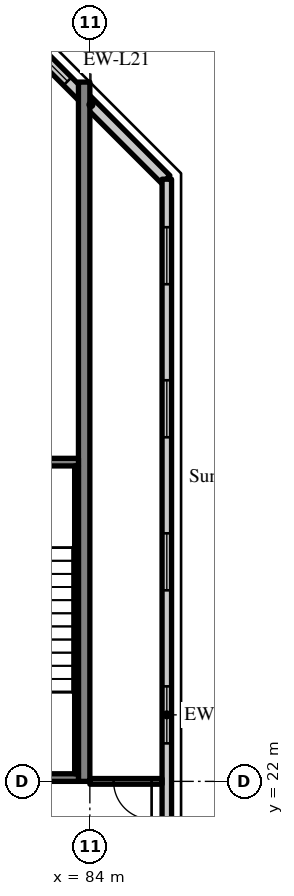
"""IFC4 building model, lengths in metres.
Left out: names, types, materials, properties, quantities, classifications, styles, units other than length and angle.
Written with IfcOpenShell. Run it as: python <this file> out.ifc"""

import sys

from ifc_helpers import new_model, si_unit, direction, frame, frame_2d, origin, place, context, subcontext, project, spatial, rectangle, extrude, source, transform, mapped, element, fill, save


model = new_model("IFC4")
c1 = context("Model", 3, precision=1e-05, world=origin(), true_north=direction((0.0, 1.0)))
c2 = subcontext(c1, "Body", "Model", "MODEL_VIEW")
j1 = project(units=[si_unit("LENGTHUNIT", "METRE"), si_unit("PLANEANGLEUNIT", "RADIAN")], contexts=[c1])
p1 = place(None, origin())
s1 = spatial("IfcSite", under=j1, at=p1, CompositionType="ELEMENT")
p2 = place(p1, origin())
s2 = spatial("IfcBuilding", under=s1, at=p2, CompositionType="ELEMENT")
p3 = place(p2, frame((0.0, 0.0, 229.6)))
s3 = spatial("IfcBuildingStorey", under=s2, at=p3, CompositionType="ELEMENT", Elevation=229.6)
m1 = source(origin(), c2, "Body", "SweptSolid", [
    extrude(rectangle(XDim=18.4, YDim=0.3, at=frame_2d((9.2, 0.0))), origin(), (0.0, 0.0, 1.0), 3.62),
])
p4 = place(p3, frame((83.85, 22.0, 0.0), z_axis=(0.0, 0.0, 1.0), x_axis=(0.0, 1.0, 0.0)))
e1 = element("IfcWall", 1, at=p4, inside=s3, PredefinedType="SHEAR", context=c2, shape_type="MappedRepresentation", body=[
    mapped(m1, transform((0.0, 0.0, 0.0), scale=1.0)),
])
m2 = source(origin(), c2, "Body", "SweptSolid", [
    extrude(rectangle(XDim=5.576, YDim=0.3, at=frame_2d((2.788, 0.0))), origin(), (0.0, 0.0, 1.0), 3.62),
])
p5 = place(p3, frame((86.0, 37.834, 0.0), z_axis=(0.0, 0.0, 1.0), x_axis=(-0.707106781187, 0.707106781187, 0.0)))
e2 = element("IfcWall", 2, at=p5, inside=s3, PredefinedType="SOLIDWALL", context=c2, shape_type="MappedRepresentation", body=[
    mapped(m2, transform((0.0, 0.0, 0.0), scale=1.0)),
])
m3 = source(origin(), c2, "Body", "SweptSolid", [
    extrude(rectangle(XDim=1.8, YDim=1.5, at=frame_2d((0.9, 0.75))), frame((0.0, 0.16, 0.0), z_axis=(0.0, -1.0, 0.0), x_axis=(1.0, 0.0, 0.0)), (0.0, 0.0, 1.0), 0.32),
])
p6 = place(p5, frame((3.658, 0.0, 0.9)))
e3 = element("IfcOpeningElement", 3, at=p6, cuts=e2, PredefinedType="OPENING", context=c2, shape_type="MappedRepresentation", body=[
    mapped(m3, transform((0.0, 0.0, 0.0), scale=1.0)),
])
m4 = source(origin(), c2, "Body", "SweptSolid", [
    extrude(rectangle(XDim=28.189, YDim=0.25, at=frame_2d((14.095, 0.0))), origin(), (0.0, 0.0, 1.0), 3.62),
])
p7 = place(p3, frame((86.025, 9.655, 0.0), z_axis=(0.0, 0.0, 1.0), x_axis=(0.0, 1.0, 0.0)))
e4 = element("IfcWall", 4, at=p7, inside=s3, PredefinedType="SOLIDWALL", context=c2, shape_type="MappedRepresentation", body=[
    mapped(m4, transform((0.0, 0.0, 0.0), scale=1.0)),
])
m5 = source(origin(), c2, "Body", "SweptSolid", [
    extrude(rectangle(XDim=1.5, YDim=1.5, at=frame_2d((0.75, 0.75))), frame((0.0, 0.135, 0.0), z_axis=(0.0, -1.0, 0.0), x_axis=(1.0, 0.0, 0.0)), (0.0, 0.0, 1.0), 0.27),
])
p8 = place(p7, frame((1.263, 0.0, 0.9)))
e5 = element("IfcOpeningElement", 5, at=p8, cuts=e4, PredefinedType="OPENING", context=c2, shape_type="MappedRepresentation", body=[
    mapped(m5, transform((0.0, 0.0, 0.0), scale=1.0)),
])
p9 = place(p7, frame((5.291, 0.0, 0.9)))
e6 = element("IfcOpeningElement", 6, at=p9, cuts=e4, PredefinedType="OPENING", context=c2, shape_type="MappedRepresentation", body=[
    mapped(m5, transform((0.0, 0.0, 0.0), scale=1.0)),
])
p10 = place(p7, frame((9.318, 0.0, 0.9)))
e7 = element("IfcOpeningElement", 7, at=p10, cuts=e4, PredefinedType="OPENING", context=c2, shape_type="MappedRepresentation", body=[
    mapped(m5, transform((0.0, 0.0, 0.0), scale=1.0)),
])
p11 = place(p7, frame((13.345, 0.0, 0.9)))
e8 = element("IfcOpeningElement", 8, at=p11, cuts=e4, PredefinedType="OPENING", context=c2, shape_type="MappedRepresentation", body=[
    mapped(m5, transform((0.0, 0.0, 0.0), scale=1.0)),
])
p12 = place(p7, frame((17.372, 0.0, 0.9)))
e9 = element("IfcOpeningElement", 9, at=p12, cuts=e4, PredefinedType="OPENING", context=c2, shape_type="MappedRepresentation", body=[
    mapped(m5, transform((0.0, 0.0, 0.0), scale=1.0)),
])
p13 = place(p7, frame((21.399, 0.0, 0.9)))
e10 = element("IfcOpeningElement", 10, at=p13, cuts=e4, PredefinedType="OPENING", context=c2, shape_type="MappedRepresentation", body=[
    mapped(m5, transform((0.0, 0.0, 0.0), scale=1.0)),
])
p14 = place(p7, frame((25.426, 0.0, 0.9)))
e11 = element("IfcOpeningElement", 11, at=p14, cuts=e4, PredefinedType="OPENING", context=c2, shape_type="MappedRepresentation", body=[
    mapped(m5, transform((0.0, 0.0, 0.0), scale=1.0)),
])
m6 = source(origin(), c2, "Body", "SweptSolid", [
    extrude(rectangle(XDim=8.1, YDim=0.2, at=frame_2d((4.05, 0.0))), origin(), (0.0, 0.0, 1.0), 3.62),
])
p15 = place(p3, frame((83.7, 22.1, 0.0), z_axis=(0.0, 0.0, 1.0), x_axis=(-1.0, 0.0, 0.0)))
e12 = element("IfcWall", 12, at=p15, inside=s3, PredefinedType="SOLIDWALL", context=c2, shape_type="MappedRepresentation", body=[
    mapped(m6, transform((0.0, 0.0, 0.0), scale=1.0)),
])
m7 = source(origin(), c2, "Body", "SweptSolid", [
    extrude(rectangle(XDim=1.2, YDim=2.1, at=frame_2d((0.6, 1.05))), frame((0.0, 0.11, 0.0), z_axis=(0.0, -1.0, 0.0), x_axis=(1.0, 0.0, 0.0)), (0.0, 0.0, 1.0), 0.22),
])
p16 = place(p15, frame((5.9, 0.0, 0.0)))
e13 = element("IfcOpeningElement", 13, at=p16, cuts=e12, PredefinedType="OPENING", context=c2, shape_type="MappedRepresentation", body=[
    mapped(m7, transform((0.0, 0.0, 0.0), scale=1.0)),
])
p17 = place(p3, frame((83.7, 30.4, 0.0), z_axis=(0.0, 0.0, 1.0), x_axis=(-1.0, 0.0, 0.0)))
e14 = element("IfcWall", 14, at=p17, inside=s3, PredefinedType="SOLIDWALL", context=c2, shape_type="MappedRepresentation", body=[
    mapped(m6, transform((0.0, 0.0, 0.0), scale=1.0)),
])
m8 = source(origin(), c2, "Body", "SweptSolid", [
    extrude(rectangle(XDim=1.0, YDim=2.1, at=frame_2d((0.5, 1.05))), frame((0.0, 0.11, 0.0), z_axis=(0.0, -1.0, 0.0), x_axis=(1.0, 0.0, 0.0)), (0.0, 0.0, 1.0), 0.22),
])
p18 = place(p17, frame((6.0, 0.0, 0.0)))
e15 = element("IfcOpeningElement", 15, at=p18, cuts=e14, PredefinedType="OPENING", context=c2, shape_type="MappedRepresentation", body=[
    mapped(m8, transform((0.0, 0.0, 0.0), scale=1.0)),
])
m9 = source(origin(), c2, "Body", "SweptSolid", [
    extrude(rectangle(XDim=8.1, YDim=0.1, at=frame_2d((4.05, 0.0))), origin(), (0.0, 0.0, 1.0), 3.62),
])
p19 = place(p3, frame((83.65, 22.2, 0.0), z_axis=(0.0, 0.0, 1.0), x_axis=(0.0, 1.0, 0.0)))
e16 = element("IfcWall", 16, at=p19, inside=s3, PredefinedType="SOLIDWALL", context=c2, shape_type="MappedRepresentation", body=[
    mapped(m9, transform((0.0, 0.0, 0.0), scale=1.0)),
])
m10 = source(origin(), c2, "Body", "SweptSolid", [
    extrude(rectangle(XDim=1.9, YDim=0.15, at=frame_2d((0.95, 0.0))), origin(), (0.0, 0.0, 1.0), 2.92),
])
p20 = place(p3, frame((84.0, 22.0, 0.0), z_axis=(0.0, 0.0, 1.0), x_axis=(1.0, 0.0, 0.0)))
e17 = element("IfcWall", 17, at=p20, inside=s3, PredefinedType="PARTITIONING", context=c2, shape_type="MappedRepresentation", body=[
    mapped(m10, transform((0.0, 0.0, 0.0), scale=1.0)),
])
m11 = source(origin(), c2, "Body", "SweptSolid", [
    extrude(rectangle(XDim=1.0, YDim=2.1, at=frame_2d((0.5, 1.05))), frame((0.0, 0.085, 0.0), z_axis=(0.0, -1.0, 0.0), x_axis=(1.0, 0.0, 0.0)), (0.0, 0.0, 1.0), 0.17),
])
p21 = place(p20, frame((0.625, 0.0, 0.0)))
e18 = element("IfcOpeningElement", 18, at=p21, cuts=e17, PredefinedType="OPENING", context=c2, shape_type="MappedRepresentation", body=[
    mapped(m11, transform((0.0, 0.0, 0.0), scale=1.0)),
])
m12 = source(origin(), c2, "Body", "SweptSolid", [
    extrude(rectangle(XDim=1.8, YDim=1.5, at=frame_2d((0.9, 0.75))), frame((0.0, 0.03, 0.0), z_axis=(0.0, -1.0, 0.0), x_axis=(1.0, 0.0, 0.0)), (0.0, 0.0, 1.0), 0.06),
])
p22 = place(p6, origin())
e19 = element("IfcWindow", 19, at=p22, inside=s3, PartitioningType="SINGLE_PANEL", PredefinedType="WINDOW", context=c2, shape_type="MappedRepresentation", body=[
    mapped(m12, transform((0.0, 0.0, 0.0), scale=1.0)),
])
fill(e3, e19)
m13 = source(origin(), c2, "Body", "SweptSolid", [
    extrude(rectangle(XDim=1.5, YDim=1.5, at=frame_2d((0.75, 0.75))), frame((0.0, 0.03, 0.0), z_axis=(0.0, -1.0, 0.0), x_axis=(1.0, 0.0, 0.0)), (0.0, 0.0, 1.0), 0.06),
])
p23 = place(p11, origin())
e20 = element("IfcWindow", 20, at=p23, inside=s3, PartitioningType="SINGLE_PANEL", PredefinedType="WINDOW", context=c2, shape_type="MappedRepresentation", body=[
    mapped(m13, transform((0.0, 0.0, 0.0), scale=1.0)),
])
fill(e8, e20)
p24 = place(p12, origin())
e21 = element("IfcWindow", 21, at=p24, inside=s3, PartitioningType="SINGLE_PANEL", PredefinedType="WINDOW", context=c2, shape_type="MappedRepresentation", body=[
    mapped(m13, transform((0.0, 0.0, 0.0), scale=1.0)),
])
fill(e9, e21)
p25 = place(p13, origin())
e22 = element("IfcWindow", 22, at=p25, inside=s3, PartitioningType="SINGLE_PANEL", PredefinedType="WINDOW", context=c2, shape_type="MappedRepresentation", body=[
    mapped(m13, transform((0.0, 0.0, 0.0), scale=1.0)),
])
fill(e10, e22)
p26 = place(p14, origin())
e23 = element("IfcWindow", 23, at=p26, inside=s3, PartitioningType="SINGLE_PANEL", PredefinedType="WINDOW", context=c2, shape_type="MappedRepresentation", body=[
    mapped(m13, transform((0.0, 0.0, 0.0), scale=1.0)),
])
fill(e11, e23)
m14 = source(origin(), c2, "Body", "SweptSolid", [
    extrude(rectangle(XDim=1.0, YDim=2.1, at=frame_2d((0.5, 1.05))), frame((0.0, 0.025, 0.0), z_axis=(0.0, -1.0, 0.0), x_axis=(1.0, 0.0, 0.0)), (0.0, 0.0, 1.0), 0.05),
])
p27 = place(p21, origin())
e24 = element("IfcDoor", 24, at=p27, inside=s3, OperationType="SINGLE_SWING_RIGHT", PredefinedType="DOOR", context=c2, shape_type="MappedRepresentation", body=[
    mapped(m14, transform((0.0, 0.0, 0.0), scale=1.0)),
])
fill(e18, e24)
save(model, sys.argv[1])
